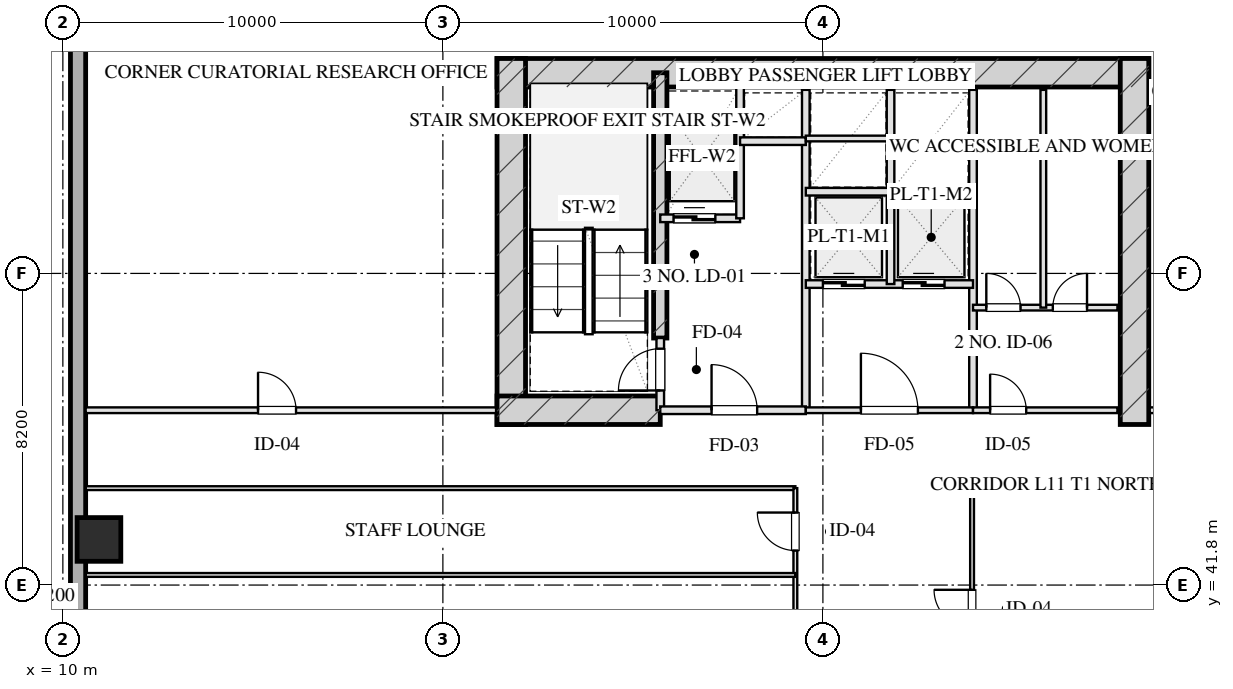
"""IFC4 building model, lengths in metres.
Left out: names, types, materials, properties, quantities, classifications, styles, units other than length and angle.
Written with IfcOpenShell. Run it as: python <this file> out.ifc"""

import sys

from ifc_helpers import new_model, si_unit, direction, frame, frame_2d, origin, origin_2d, place, context, subcontext, project, spatial, rectangle, hollow_rectangle, extrude, element, fill, save


model = new_model("IFC4")
c1 = context("Model", 3, precision=1e-05, world=origin(), true_north=direction((0.0, 1.0)))
c2 = subcontext(c1, "Body", "Model", "MODEL_VIEW")
j1 = project(units=[si_unit("LENGTHUNIT", "METRE"), si_unit("PLANEANGLEUNIT", "RADIAN")], contexts=[c1])
p1 = place(None, origin())
s1 = spatial("IfcSite", under=j1, at=p1, CompositionType="ELEMENT")
p2 = place(p1, origin())
s2 = spatial("IfcBuilding", under=s1, at=p2, CompositionType="ELEMENT")
p3 = place(p2, frame((0.0, 0.0, 50.6)))
s3 = spatial("IfcBuildingStorey", under=s2, at=p3, CompositionType="ELEMENT", Elevation=50.6)
p4 = place(p3, frame((21.425, 55.28, 0.0), z_axis=(0.0, 0.0, 1.0), x_axis=(1.0, 0.0, 0.0)))
e1 = element("IfcWall", 1, at=p4, inside=s3, PredefinedType="SHEAR", context=c2, shape_type="SweptSolid", body=[
    extrude(rectangle(XDim=17.15, YDim=0.75, at=frame_2d((8.575, 0.0))), origin(), (0.0, 0.0, 1.0), 3.45),
])
for number, where, z_axis, x_axis in (
    (2, (21.8, 46.025, 0.0), (0.0, 0.0, 1.0), (0.0, 1.0, 0.0)),
    (3, (38.2, 46.025, 0.0), (0.0, 0.0, 1.0), (0.0, 1.0, 0.0)),
):
    element("IfcWall", number, at=place(p3, frame(where, z_axis=z_axis, x_axis=x_axis)), inside=s3, PredefinedType="SHEAR", context=c2, shape_type="SweptSolid", body=[
        extrude(rectangle(XDim=9.63, YDim=0.75, at=frame_2d((4.815, 0.0))), origin(), (0.0, 0.0, 1.0), 3.45),
    ])
p5 = place(p3, frame((25.72, 48.3, 0.0), z_axis=(0.0, 0.0, 1.0), x_axis=(0.0, 1.0, 0.0)))
e4 = element("IfcWall", 4, at=p5, inside=s3, PredefinedType="SHEAR", context=c2, shape_type="SweptSolid", body=[
    extrude(rectangle(XDim=6.98, YDim=0.35, at=frame_2d((3.49, 0.0))), origin(), (0.0, 0.0, 1.0), 3.45),
])
p6 = place(p3, frame((21.425, 46.4, 0.0), z_axis=(0.0, 0.0, 1.0), x_axis=(1.0, 0.0, 0.0)))
e5 = element("IfcWall", 5, at=p6, inside=s3, PredefinedType="SHEAR", context=c2, shape_type="SweptSolid", body=[
    extrude(rectangle(XDim=4.295, YDim=0.75, at=frame_2d((2.147, 0.0))), origin(), (0.0, 0.0, 1.0), 3.45),
])
p7 = place(p3, frame((10.95, 43.0, 0.0), z_axis=(0.0, 0.0, 1.0), x_axis=(1.0, 0.0, 0.0)))
e6 = element("IfcColumn", 6, at=p7, inside=s3, PredefinedType="COLUMN", context=c2, shape_type="SweptSolid", body=[
    extrude(hollow_rectangle(XDim=1.15, YDim=1.15, WallThickness=0.04, at=origin_2d()), origin(), (0.0, 0.0, 1.0), 3.451),
])
p8 = place(p3, frame((10.4, 7.2, 0.0), z_axis=(0.0, 0.0, 1.0), x_axis=(0.0, 1.0, 0.0)))
e7 = element("IfcWall", 7, at=p8, inside=s3, PredefinedType="SOLIDWALL", context=c2, shape_type="SweptSolid", body=[
    extrude(rectangle(XDim=53.6, YDim=0.4, at=frame_2d((26.8, 0.0))), origin(), (0.0, 0.0, 1.0), 2.61),
])
p9 = place(p8, frame((29.35, 0.0, 0.0)))
e8 = element("IfcOpeningElement", 8, at=p9, cuts=e7, PredefinedType="OPENING", context=c2, shape_type="SweptSolid", body=[
    extrude(rectangle(XDim=1.1, YDim=2.15, at=frame_2d((0.55, 1.075))), frame((0.0, 0.21, 0.0), z_axis=(0.0, -1.0, 0.0), x_axis=(1.0, 0.0, 0.0)), (0.0, 0.0, 1.0), 0.42),
])
p10 = place(p3, frame((25.72, 46.4, 0.0), z_axis=(0.0, 0.0, 1.0), x_axis=(0.0, 1.0, 0.0)))
e9 = element("IfcWall", 9, at=p10, inside=s3, PredefinedType="PARTITIONING", context=c2, shape_type="SweptSolid", body=[
    extrude(rectangle(XDim=1.9, YDim=0.2, at=frame_2d((0.95, 0.0))), origin(), (0.0, 0.0, 1.0), 3.175),
])
p11 = place(p10, frame((0.52, 0.0, 0.0)))
e10 = element("IfcOpeningElement", 10, at=p11, cuts=e9, PredefinedType="OPENING", context=c2, shape_type="SweptSolid", body=[
    extrude(rectangle(XDim=1.1, YDim=2.05, at=frame_2d((0.55, 1.025))), frame((0.0, 0.11, 0.0), z_axis=(0.0, -1.0, 0.0), x_axis=(1.0, 0.0, 0.0)), (0.0, 0.0, 1.0), 0.22),
])
p12 = place(p3, frame((29.55, 46.4, 0.0), z_axis=(0.0, 0.0, 1.0), x_axis=(0.0, 1.0, 0.0)))
e11 = element("IfcWall", 11, at=p12, inside=s3, PredefinedType="PARTITIONING", context=c2, shape_type="SweptSolid", body=[
    extrude(rectangle(XDim=8.43, YDim=0.2, at=frame_2d((4.215, 0.0))), origin(), (0.0, 0.0, 1.0), 3.175),
])
p13 = place(p3, frame((25.72, 46.4, 0.0), z_axis=(0.0, 0.0, 1.0), x_axis=(1.0, 0.0, 0.0)))
e12 = element("IfcWall", 12, at=p13, inside=s3, PredefinedType="PARTITIONING", context=c2, shape_type="SweptSolid", body=[
    extrude(rectangle(XDim=3.83, YDim=0.2, at=frame_2d((1.915, 0.0))), origin(), (0.0, 0.0, 1.0), 3.175),
])
p14 = place(p13, frame((1.35, 0.0, 0.0)))
e13 = element("IfcOpeningElement", 13, at=p14, cuts=e12, PredefinedType="OPENING", context=c2, shape_type="SweptSolid", body=[
    extrude(rectangle(XDim=1.2, YDim=2.05, at=frame_2d((0.6, 1.025))), frame((0.0, 0.11, 0.0), z_axis=(0.0, -1.0, 0.0), x_axis=(1.0, 0.0, 0.0)), (0.0, 0.0, 1.0), 0.22),
])
p15 = place(p3, frame((25.72, 51.45, 0.0), z_axis=(0.0, 0.0, 1.0), x_axis=(1.0, 0.0, 0.0)))
e14 = element("IfcWall", 14, at=p15, inside=s3, PredefinedType="PARTITIONING", context=c2, shape_type="SweptSolid", body=[
    extrude(rectangle(XDim=2.1, YDim=0.2, at=frame_2d((1.05, 0.0))), origin(), (0.0, 0.0, 1.0), 3.175),
])
p16 = place(p15, frame((0.35, 0.0, 0.0)))
e15 = element("IfcOpeningElement", 15, at=p16, cuts=e14, PredefinedType="OPENING", context=c2, shape_type="SweptSolid", body=[
    extrude(rectangle(XDim=1.1, YDim=2.05, at=frame_2d((0.55, 1.025))), frame((0.0, 0.11, 0.0), z_axis=(0.0, -1.0, 0.0), x_axis=(1.0, 0.0, 0.0)), (0.0, 0.0, 1.0), 0.22),
])
p17 = place(p3, frame((27.82, 51.45, 0.0), z_axis=(0.0, 0.0, 1.0), x_axis=(0.0, 1.0, 0.0)))
e16 = element("IfcWall", 16, at=p17, inside=s3, PredefinedType="PARTITIONING", context=c2, shape_type="SweptSolid", body=[
    extrude(rectangle(XDim=3.7, YDim=0.2, at=frame_2d((1.85, 0.0))), origin(), (0.0, 0.0, 1.0), 3.175),
])
p18 = place(p3, frame((27.82, 53.48, 0.0), z_axis=(0.0, 0.0, 1.0), x_axis=(1.0, 0.0, 0.0)))
e17 = element("IfcWall", 17, at=p18, inside=s3, PredefinedType="PARTITIONING", context=c2, shape_type="SweptSolid", body=[
    extrude(rectangle(XDim=1.73, YDim=0.2, at=frame_2d((0.865, 0.0))), origin(), (0.0, 0.0, 1.0), 3.175),
])
p19 = place(p3, frame((33.95, 46.4, 0.0), z_axis=(0.0, 0.0, 1.0), x_axis=(0.0, 1.0, 0.0)))
e18 = element("IfcWall", 18, at=p19, inside=s3, PredefinedType="PARTITIONING", context=c2, shape_type="SweptSolid", body=[
    extrude(rectangle(XDim=8.43, YDim=0.2, at=frame_2d((4.215, 0.0))), origin(), (0.0, 0.0, 1.0), 3.175),
])
p20 = place(p3, frame((29.55, 46.4, 0.0), z_axis=(0.0, 0.0, 1.0), x_axis=(1.0, 0.0, 0.0)))
e19 = element("IfcWall", 19, at=p20, inside=s3, PredefinedType="PARTITIONING", context=c2, shape_type="SweptSolid", body=[
    extrude(rectangle(XDim=4.4, YDim=0.15, at=frame_2d((2.2, 0.0))), origin(), (0.0, 0.0, 1.0), 3.175),
])
p21 = place(p20, frame((1.45, 0.0, 0.0)))
e20 = element("IfcOpeningElement", 20, at=p21, cuts=e19, PredefinedType="OPENING", context=c2, shape_type="SweptSolid", body=[
    extrude(rectangle(XDim=1.5, YDim=2.05, at=frame_2d((0.75, 1.025))), frame((0.0, 0.085, 0.0), z_axis=(0.0, -1.0, 0.0), x_axis=(1.0, 0.0, 0.0)), (0.0, 0.0, 1.0), 0.17),
])
p22 = place(p3, frame((29.55, 49.72, 0.0), z_axis=(0.0, 0.0, 1.0), x_axis=(1.0, 0.0, 0.0)))
e21 = element("IfcWall", 21, at=p22, inside=s3, PredefinedType="PARTITIONING", context=c2, shape_type="SweptSolid", body=[
    extrude(rectangle(XDim=4.4, YDim=0.2, at=frame_2d((2.2, 0.0))), origin(), (0.0, 0.0, 1.0), 3.175),
])
p23 = place(p22, frame((0.45, 0.0, 0.0)))
e22 = element("IfcOpeningElement", 22, at=p23, cuts=e21, PredefinedType="OPENING", context=c2, shape_type="SweptSolid", body=[
    extrude(rectangle(XDim=1.1, YDim=2.05, at=frame_2d((0.55, 1.025))), frame((0.0, 0.11, 0.0), z_axis=(0.0, -1.0, 0.0), x_axis=(1.0, 0.0, 0.0)), (0.0, 0.0, 1.0), 0.22),
])
p24 = place(p22, frame((2.55, 0.0, 0.0)))
e23 = element("IfcOpeningElement", 23, at=p24, cuts=e21, PredefinedType="OPENING", context=c2, shape_type="SweptSolid", body=[
    extrude(rectangle(XDim=1.1, YDim=2.05, at=frame_2d((0.55, 1.025))), frame((0.0, 0.11, 0.0), z_axis=(0.0, -1.0, 0.0), x_axis=(1.0, 0.0, 0.0)), (0.0, 0.0, 1.0), 0.22),
])
p25 = place(p3, frame((31.78, 49.72, 0.0), z_axis=(0.0, 0.0, 1.0), x_axis=(0.0, 1.0, 0.0)))
e24 = element("IfcWall", 24, at=p25, inside=s3, PredefinedType="PARTITIONING", context=c2, shape_type="SweptSolid", body=[
    extrude(rectangle(XDim=5.11, YDim=0.2, at=frame_2d((2.555, 0.0))), origin(), (0.0, 0.0, 1.0), 3.175),
])
p26 = place(p3, frame((29.55, 52.15, 0.0), z_axis=(0.0, 0.0, 1.0), x_axis=(1.0, 0.0, 0.0)))
e25 = element("IfcWall", 25, at=p26, inside=s3, PredefinedType="PARTITIONING", context=c2, shape_type="SweptSolid", body=[
    extrude(rectangle(XDim=4.4, YDim=0.2, at=frame_2d((2.2, 0.0))), origin(), (0.0, 0.0, 1.0), 3.175),
])
p27 = place(p3, frame((29.55, 53.55, 0.0), z_axis=(0.0, 0.0, 1.0), x_axis=(1.0, 0.0, 0.0)))
e26 = element("IfcWall", 26, at=p27, inside=s3, PredefinedType="PARTITIONING", context=c2, shape_type="SweptSolid", body=[
    extrude(rectangle(XDim=2.23, YDim=0.15, at=frame_2d((1.115, 0.0))), origin(), (0.0, 0.0, 1.0), 3.175),
])
p28 = place(p3, frame((33.95, 46.4, 0.0), z_axis=(0.0, 0.0, 1.0), x_axis=(1.0, 0.0, 0.0)))
e27 = element("IfcWall", 27, at=p28, inside=s3, PredefinedType="PARTITIONING", context=c2, shape_type="SweptSolid", body=[
    extrude(rectangle(XDim=3.8, YDim=0.15, at=frame_2d((1.9, 0.0))), origin(), (0.0, 0.0, 1.0), 3.175),
])
p29 = place(p28, frame((0.45, 0.0, 0.0)))
e28 = element("IfcOpeningElement", 28, at=p29, cuts=e27, PredefinedType="OPENING", context=c2, shape_type="SweptSolid", body=[
    extrude(rectangle(XDim=0.95, YDim=2.05, at=frame_2d((0.475, 1.025))), frame((0.0, 0.085, 0.0), z_axis=(0.0, -1.0, 0.0), x_axis=(1.0, 0.0, 0.0)), (0.0, 0.0, 1.0), 0.17),
])
p30 = place(p3, frame((33.95, 49.1, 0.0), z_axis=(0.0, 0.0, 1.0), x_axis=(1.0, 0.0, 0.0)))
e29 = element("IfcWall", 29, at=p30, inside=s3, PredefinedType="PARTITIONING", context=c2, shape_type="SweptSolid", body=[
    extrude(rectangle(XDim=3.8, YDim=0.15, at=frame_2d((1.9, 0.0))), origin(), (0.0, 0.0, 1.0), 3.175),
])
p31 = place(p30, frame((0.35, 0.0, 0.0)))
e30 = element("IfcOpeningElement", 30, at=p31, cuts=e29, PredefinedType="OPENING", context=c2, shape_type="SweptSolid", body=[
    extrude(rectangle(XDim=0.9, YDim=2.05, at=frame_2d((0.45, 1.025))), frame((0.0, 0.085, 0.0), z_axis=(0.0, -1.0, 0.0), x_axis=(1.0, 0.0, 0.0)), (0.0, 0.0, 1.0), 0.17),
])
p32 = place(p30, frame((2.1, 0.0, 0.0)))
e31 = element("IfcOpeningElement", 31, at=p32, cuts=e29, PredefinedType="OPENING", context=c2, shape_type="SweptSolid", body=[
    extrude(rectangle(XDim=0.9, YDim=2.05, at=frame_2d((0.45, 1.025))), frame((0.0, 0.085, 0.0), z_axis=(0.0, -1.0, 0.0), x_axis=(1.0, 0.0, 0.0)), (0.0, 0.0, 1.0), 0.17),
])
p33 = place(p3, frame((35.8, 49.1, 0.0), z_axis=(0.0, 0.0, 1.0), x_axis=(0.0, 1.0, 0.0)))
e32 = element("IfcWall", 32, at=p33, inside=s3, PredefinedType="PARTITIONING", context=c2, shape_type="SweptSolid", body=[
    extrude(rectangle(XDim=5.73, YDim=0.15, at=frame_2d((2.865, 0.0))), origin(), (0.0, 0.0, 1.0), 3.175),
])
p34 = place(p3, frame((10.6, 46.4, 0.0), z_axis=(0.0, 0.0, 1.0), x_axis=(1.0, 0.0, 0.0)))
e33 = element("IfcWall", 33, at=p34, inside=s3, PredefinedType="PARTITIONING", context=c2, shape_type="SweptSolid", body=[
    extrude(rectangle(XDim=10.8, YDim=0.15, at=frame_2d((5.4, 0.0))), origin(), (0.0, 0.0, 1.0), 3.175),
])
p35 = place(p34, frame((4.536, 0.0, 0.0)))
e34 = element("IfcOpeningElement", 34, at=p35, cuts=e33, PredefinedType="OPENING", context=c2, shape_type="SweptSolid", body=[
    extrude(rectangle(XDim=1.0, YDim=2.05, at=frame_2d((0.5, 1.025))), frame((0.0, 0.085, 0.0), z_axis=(0.0, -1.0, 0.0), x_axis=(1.0, 0.0, 0.0)), (0.0, 0.0, 1.0), 0.17),
])
p36 = place(p3, frame((38.6, 46.4, 0.0), z_axis=(0.0, 0.0, 1.0), x_axis=(1.0, 0.0, 0.0)))
e35 = element("IfcWall", 35, at=p36, inside=s3, PredefinedType="PARTITIONING", context=c2, shape_type="SweptSolid", body=[
    extrude(rectangle(XDim=10.8, YDim=0.15, at=frame_2d((5.4, 0.0))), origin(), (0.0, 0.0, 1.0), 3.175),
])
p37 = place(p36, frame((4.536, 0.0, 0.0)))
e36 = element("IfcOpeningElement", 36, at=p37, cuts=e35, PredefinedType="OPENING", context=c2, shape_type="SweptSolid", body=[
    extrude(rectangle(XDim=1.0, YDim=2.05, at=frame_2d((0.5, 1.025))), frame((0.0, 0.085, 0.0), z_axis=(0.0, -1.0, 0.0), x_axis=(1.0, 0.0, 0.0)), (0.0, 0.0, 1.0), 0.17),
])
p38 = place(p3, frame((10.6, 44.35, 0.0), z_axis=(0.0, 0.0, 1.0), x_axis=(1.0, 0.0, 0.0)))
e37 = element("IfcWall", 37, at=p38, inside=s3, PredefinedType="MOVABLE", context=c2, shape_type="SweptSolid", body=[
    extrude(rectangle(XDim=18.675, YDim=0.1, at=frame_2d((9.337, 0.0))), origin(), (0.0, 0.0, 1.0), 3.175),
])
p39 = place(p3, frame((33.925, 44.35, 0.0), z_axis=(0.0, 0.0, 1.0), x_axis=(1.0, 0.0, 0.0)))
e38 = element("IfcWall", 38, at=p39, inside=s3, PredefinedType="MOVABLE", context=c2, shape_type="SweptSolid", body=[
    extrude(rectangle(XDim=15.475, YDim=0.1, at=frame_2d((7.737, 0.0))), origin(), (0.0, 0.0, 1.0), 3.175),
])
p40 = place(p3, frame((29.275, 23.65, 0.0), z_axis=(0.0, 0.0, 1.0), x_axis=(0.0, 1.0, 0.0)))
e39 = element("IfcWall", 39, at=p40, inside=s3, PredefinedType="MOVABLE", context=c2, shape_type="SweptSolid", body=[
    extrude(rectangle(XDim=20.7, YDim=0.1, at=frame_2d((10.35, 0.0))), origin(), (0.0, 0.0, 1.0), 3.175),
])
p41 = place(p40, frame((0.775, 0.0, 0.0)))
e40 = element("IfcOpeningElement", 40, at=p41, cuts=e39, PredefinedType="OPENING", context=c2, shape_type="SweptSolid", body=[
    extrude(rectangle(XDim=1.0, YDim=2.05, at=frame_2d((0.5, 1.025))), frame((0.0, 0.06, 0.0), z_axis=(0.0, -1.0, 0.0), x_axis=(1.0, 0.0, 0.0)), (0.0, 0.0, 1.0), 0.12),
])
p42 = place(p40, frame((3.95, 0.0, 0.0)))
e41 = element("IfcOpeningElement", 41, at=p42, cuts=e39, PredefinedType="OPENING", context=c2, shape_type="SweptSolid", body=[
    extrude(rectangle(XDim=1.0, YDim=2.05, at=frame_2d((0.5, 1.025))), frame((0.0, 0.06, 0.0), z_axis=(0.0, -1.0, 0.0), x_axis=(1.0, 0.0, 0.0)), (0.0, 0.0, 1.0), 0.12),
])
p43 = place(p40, frame((8.364, 0.0, 0.0)))
e42 = element("IfcOpeningElement", 42, at=p43, cuts=e39, PredefinedType="OPENING", context=c2, shape_type="SweptSolid", body=[
    extrude(rectangle(XDim=1.0, YDim=2.05, at=frame_2d((0.5, 1.025))), frame((0.0, 0.06, 0.0), z_axis=(0.0, -1.0, 0.0), x_axis=(1.0, 0.0, 0.0)), (0.0, 0.0, 1.0), 0.12),
])
p44 = place(p40, frame((12.864, 0.0, 0.0)))
e43 = element("IfcOpeningElement", 43, at=p44, cuts=e39, PredefinedType="OPENING", context=c2, shape_type="SweptSolid", body=[
    extrude(rectangle(XDim=1.0, YDim=2.05, at=frame_2d((0.5, 1.025))), frame((0.0, 0.06, 0.0), z_axis=(0.0, -1.0, 0.0), x_axis=(1.0, 0.0, 0.0)), (0.0, 0.0, 1.0), 0.12),
])
p45 = place(p40, frame((16.383, 0.0, 0.0)))
e44 = element("IfcOpeningElement", 44, at=p45, cuts=e39, PredefinedType="OPENING", context=c2, shape_type="SweptSolid", body=[
    extrude(rectangle(XDim=1.05, YDim=2.05, at=frame_2d((0.525, 1.025))), frame((0.0, 0.06, 0.0), z_axis=(0.0, -1.0, 0.0), x_axis=(1.0, 0.0, 0.0)), (0.0, 0.0, 1.0), 0.12),
])
p46 = place(p40, frame((19.058, 0.0, 0.0)))
e45 = element("IfcOpeningElement", 45, at=p46, cuts=e39, PredefinedType="OPENING", context=c2, shape_type="SweptSolid", body=[
    extrude(rectangle(XDim=1.0, YDim=2.05, at=frame_2d((0.5, 1.025))), frame((0.0, 0.06, 0.0), z_axis=(0.0, -1.0, 0.0), x_axis=(1.0, 0.0, 0.0)), (0.0, 0.0, 1.0), 0.12),
])
p47 = place(p3, frame((33.925, 23.65, 0.0), z_axis=(0.0, 0.0, 1.0), x_axis=(0.0, 1.0, 0.0)))
e46 = element("IfcWall", 46, at=p47, inside=s3, PredefinedType="MOVABLE", context=c2, shape_type="SweptSolid", body=[
    extrude(rectangle(XDim=20.7, YDim=0.1, at=frame_2d((10.35, 0.0))), origin(), (0.0, 0.0, 1.0), 3.175),
])
p48 = place(p47, frame((2.675, 0.0, 0.0)))
e47 = element("IfcOpeningElement", 47, at=p48, cuts=e46, PredefinedType="OPENING", context=c2, shape_type="SweptSolid", body=[
    extrude(rectangle(XDim=1.0, YDim=2.05, at=frame_2d((0.5, 1.025))), frame((0.0, 0.06, 0.0), z_axis=(0.0, -1.0, 0.0), x_axis=(1.0, 0.0, 0.0)), (0.0, 0.0, 1.0), 0.12),
])
p49 = place(p47, frame((9.85, 0.0, 0.0)))
e48 = element("IfcOpeningElement", 48, at=p49, cuts=e46, PredefinedType="OPENING", context=c2, shape_type="SweptSolid", body=[
    extrude(rectangle(XDim=0.85, YDim=2.05, at=frame_2d((0.425, 1.025))), frame((0.0, 0.06, 0.0), z_axis=(0.0, -1.0, 0.0), x_axis=(1.0, 0.0, 0.0)), (0.0, 0.0, 1.0), 0.12),
])
p50 = place(p47, frame((17.025, 0.0, 0.0)))
e49 = element("IfcOpeningElement", 49, at=p50, cuts=e46, PredefinedType="OPENING", context=c2, shape_type="SweptSolid", body=[
    extrude(rectangle(XDim=1.0, YDim=2.05, at=frame_2d((0.5, 1.025))), frame((0.0, 0.06, 0.0), z_axis=(0.0, -1.0, 0.0), x_axis=(1.0, 0.0, 0.0)), (0.0, 0.0, 1.0), 0.12),
])
p51 = place(p3, frame((10.6, 42.066, 0.0), z_axis=(0.0, 0.0, 1.0), x_axis=(1.0, 0.0, 0.0)))
e50 = element("IfcWall", 50, at=p51, inside=s3, PredefinedType="MOVABLE", context=c2, shape_type="SweptSolid", body=[
    extrude(rectangle(XDim=18.675, YDim=0.1, at=frame_2d((9.337, 0.0))), origin(), (0.0, 0.0, 1.0), 3.175),
])
p52 = place(p11, origin())
e51 = element("IfcDoor", 51, at=p52, inside=s3, OperationType="SINGLE_SWING_LEFT", PredefinedType="DOOR", context=c2, shape_type="SweptSolid", body=[
    extrude(rectangle(XDim=1.1, YDim=2.05, at=frame_2d((0.55, 1.025))), frame((0.0, 0.025, 0.0), z_axis=(0.0, -1.0, 0.0), x_axis=(1.0, 0.0, 0.0)), (0.0, 0.0, 1.0), 0.05),
])
fill(e10, e51)
p53 = place(p14, origin())
e52 = element("IfcDoor", 52, at=p53, inside=s3, OperationType="SINGLE_SWING_LEFT", PredefinedType="DOOR", context=c2, shape_type="SweptSolid", body=[
    extrude(rectangle(XDim=1.2, YDim=2.05, at=frame_2d((0.6, 1.025))), frame((0.0, 0.025, 0.0), z_axis=(0.0, -1.0, 0.0), x_axis=(1.0, 0.0, 0.0)), (0.0, 0.0, 1.0), 0.05),
])
fill(e13, e52)
p54 = place(p16, origin())
e53 = element("IfcDoor", 53, at=p54, inside=s3, OperationType="DOUBLE_DOOR_SLIDING", PredefinedType="DOOR", context=c2, shape_type="SweptSolid", body=[
    extrude(rectangle(XDim=1.1, YDim=2.05, at=frame_2d((0.55, 1.025))), frame((0.0, 0.025, 0.0), z_axis=(0.0, -1.0, 0.0), x_axis=(1.0, 0.0, 0.0)), (0.0, 0.0, 1.0), 0.05),
])
fill(e15, e53)
p55 = place(p21, origin())
e54 = element("IfcDoor", 54, at=p55, inside=s3, OperationType="SINGLE_SWING_LEFT", PredefinedType="DOOR", context=c2, shape_type="SweptSolid", body=[
    extrude(rectangle(XDim=1.5, YDim=2.05, at=frame_2d((0.75, 1.025))), frame((0.0, 0.025, 0.0), z_axis=(0.0, -1.0, 0.0), x_axis=(1.0, 0.0, 0.0)), (0.0, 0.0, 1.0), 0.05),
])
fill(e20, e54)
p56 = place(p23, origin())
e55 = element("IfcDoor", 55, at=p56, inside=s3, OperationType="DOUBLE_DOOR_SLIDING", PredefinedType="DOOR", context=c2, shape_type="SweptSolid", body=[
    extrude(rectangle(XDim=1.1, YDim=2.05, at=frame_2d((0.55, 1.025))), frame((0.0, 0.025, 0.0), z_axis=(0.0, -1.0, 0.0), x_axis=(1.0, 0.0, 0.0)), (0.0, 0.0, 1.0), 0.05),
])
fill(e22, e55)
p57 = place(p24, origin())
e56 = element("IfcDoor", 56, at=p57, inside=s3, OperationType="DOUBLE_DOOR_SLIDING", PredefinedType="DOOR", context=c2, shape_type="SweptSolid", body=[
    extrude(rectangle(XDim=1.1, YDim=2.05, at=frame_2d((0.55, 1.025))), frame((0.0, 0.025, 0.0), z_axis=(0.0, -1.0, 0.0), x_axis=(1.0, 0.0, 0.0)), (0.0, 0.0, 1.0), 0.05),
])
fill(e23, e56)
p58 = place(p29, origin())
e57 = element("IfcDoor", 57, at=p58, inside=s3, OperationType="SINGLE_SWING_LEFT", PredefinedType="DOOR", context=c2, shape_type="SweptSolid", body=[
    extrude(rectangle(XDim=0.95, YDim=2.05, at=frame_2d((0.475, 1.025))), frame((0.0, 0.025, 0.0), z_axis=(0.0, -1.0, 0.0), x_axis=(1.0, 0.0, 0.0)), (0.0, 0.0, 1.0), 0.05),
])
fill(e28, e57)
p59 = place(p31, origin())
e58 = element("IfcDoor", 58, at=p59, inside=s3, OperationType="SINGLE_SWING_LEFT", PredefinedType="DOOR", context=c2, shape_type="SweptSolid", body=[
    extrude(rectangle(XDim=0.9, YDim=2.05, at=frame_2d((0.45, 1.025))), frame((0.0, 0.025, 0.0), z_axis=(0.0, -1.0, 0.0), x_axis=(1.0, 0.0, 0.0)), (0.0, 0.0, 1.0), 0.05),
])
fill(e30, e58)
p60 = place(p32, origin())
e59 = element("IfcDoor", 59, at=p60, inside=s3, OperationType="SINGLE_SWING_RIGHT", PredefinedType="DOOR", context=c2, shape_type="SweptSolid", body=[
    extrude(rectangle(XDim=0.9, YDim=2.05, at=frame_2d((0.45, 1.025))), frame((0.0, 0.025, 0.0), z_axis=(0.0, -1.0, 0.0), x_axis=(1.0, 0.0, 0.0)), (0.0, 0.0, 1.0), 0.05),
])
fill(e31, e59)
p61 = place(p35, origin())
e60 = element("IfcDoor", 60, at=p61, inside=s3, OperationType="SINGLE_SWING_LEFT", PredefinedType="DOOR", context=c2, shape_type="SweptSolid", body=[
    extrude(rectangle(XDim=1.0, YDim=2.05, at=frame_2d((0.5, 1.025))), frame((0.0, 0.025, 0.0), z_axis=(0.0, -1.0, 0.0), x_axis=(1.0, 0.0, 0.0)), (0.0, 0.0, 1.0), 0.05),
])
fill(e34, e60)
p62 = place(p46, origin())
e61 = element("IfcDoor", 61, at=p62, inside=s3, OperationType="SINGLE_SWING_RIGHT", PredefinedType="DOOR", context=c2, shape_type="SweptSolid", body=[
    extrude(rectangle(XDim=1.0, YDim=2.05, at=frame_2d((0.5, 1.025))), frame((0.0, 0.025, 0.0), z_axis=(0.0, -1.0, 0.0), x_axis=(1.0, 0.0, 0.0)), (0.0, 0.0, 1.0), 0.05),
])
fill(e45, e61)
p63 = place(p50, origin())
e62 = element("IfcDoor", 62, at=p63, inside=s3, OperationType="SINGLE_SWING_RIGHT", PredefinedType="DOOR", context=c2, shape_type="SweptSolid", body=[
    extrude(rectangle(XDim=1.0, YDim=2.05, at=frame_2d((0.5, 1.025))), frame((0.0, 0.025, 0.0), z_axis=(0.0, -1.0, 0.0), x_axis=(1.0, 0.0, 0.0)), (0.0, 0.0, 1.0), 0.05),
])
fill(e49, e62)
save(model, sys.argv[1])
